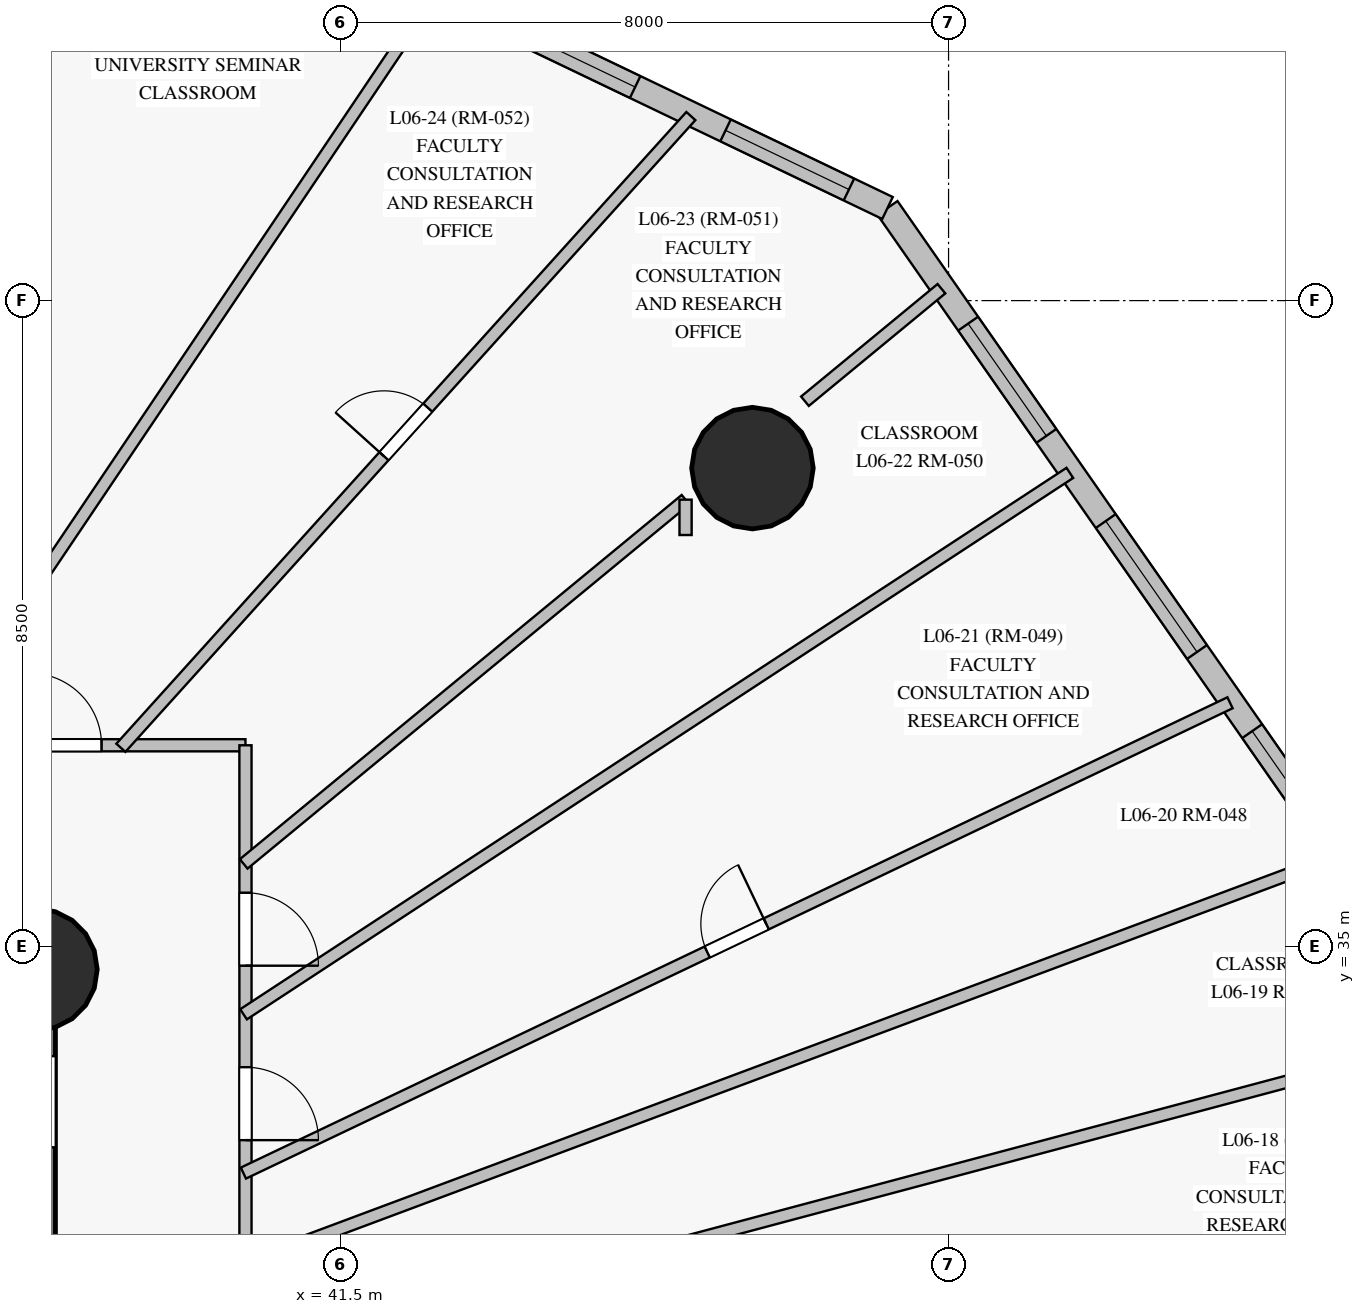
"""IFC4 building model, lengths in metres.
Left out: names, types, materials, properties, quantities, classifications, styles, units other than length and angle.
Written with IfcOpenShell. Run it as: python <this file> out.ifc"""

import sys

from ifc_helpers import new_model, si_unit, direction, frame, frame_2d, origin, origin_with_axes, origin_2d, place, context, subcontext, project, spatial, rectangle, circle, extrude, source, transform, mapped, element, fill, save


model = new_model("IFC4")
c1 = context("Model", 3, precision=1e-05, world=origin(), true_north=direction((0.0, 1.0)))
c2 = subcontext(c1, "Body", "Model", "MODEL_VIEW")
j1 = project(units=[si_unit("LENGTHUNIT", "METRE"), si_unit("PLANEANGLEUNIT", "RADIAN")], contexts=[c1])
p1 = place(None, origin())
s1 = spatial("IfcSite", under=j1, at=p1, CompositionType="ELEMENT")
p2 = place(p1, origin())
s2 = spatial("IfcBuilding", under=s1, at=p2, CompositionType="ELEMENT")
p3 = place(p2, frame((0.0, 0.0, 26.5)))
s3 = spatial("IfcBuildingStorey", under=s2, at=p3, CompositionType="ELEMENT", Elevation=26.5)
p4 = place(p3, frame((37.5, 18.3, 0.0), z_axis=(0.0, 0.0, 1.0), x_axis=(0.0, 1.0, 0.0)))
e1 = element("IfcWall", 1, at=p4, inside=s3, PredefinedType="SHEAR", context=c2, shape_type="SweptSolid", body=[
    extrude(rectangle(XDim=16.4, YDim=0.5, at=frame_2d((8.2, 0.0))), origin(), (0.0, 0.0, 1.0), 3.35),
])
p5 = place(p4, frame((14.06, 0.0, 0.0)))
e2 = element("IfcOpeningElement", 2, at=p5, cuts=e1, PredefinedType="OPENING", context=c2, shape_type="SweptSolid", body=[
    extrude(rectangle(XDim=1.2, YDim=2.15, at=frame_2d((0.6, 1.075))), frame((0.0, 0.26, 0.0), z_axis=(0.0, -1.0, 0.0), x_axis=(1.0, 0.0, 0.0)), (0.0, 0.0, 1.0), 0.52),
])
m1 = source(origin_with_axes(), c2, "Body", "SweptSolid", [
    extrude(circle(Radius=0.8, at=origin_2d()), origin(), (0.0, 0.0, 1.0), 3.6),
])
for number, where, z_axis, x_axis in (
    (3, (37.5, 34.7, 0.0), (0.0, 0.0, 1.0), (1.0, 0.0, 0.0)),
    (4, (46.92, 41.296, 0.0), (0.0, 0.0, 1.0), (1.0, 0.0, 0.0)),
):
    element("IfcColumn", number, at=place(p3, frame(where, z_axis=z_axis, x_axis=x_axis)), inside=s3, PredefinedType="COLUMN", context=c2, shape_type="MappedRepresentation", body=[
        mapped(m1, transform((0.0, 0.0, 0.0), scale=1.0)),
    ])
p6 = place(p3, frame((56.4, 33.668, 0.0), z_axis=(0.0, 0.0, 1.0), x_axis=(-0.571842194633, 0.820363641586, 0.0)))
e5 = element("IfcWall", 5, at=p6, inside=s3, PredefinedType="SOLIDWALL", context=c2, shape_type="SweptSolid", body=[
    extrude(rectangle(XDim=13.47, YDim=0.32, at=frame_2d((6.735, 0.0))), origin(), (0.0, 0.0, 1.0), 3.35),
])
p7 = place(p6, frame((0.77, 0.0, 0.85)))
e6 = element("IfcOpeningElement", 6, at=p7, cuts=e5, PredefinedType="OPENING", context=c2, shape_type="SweptSolid", body=[
    extrude(rectangle(XDim=1.8, YDim=1.85, at=frame_2d((0.9, 0.925))), frame((0.0, 0.17, 0.0), z_axis=(0.0, -1.0, 0.0), x_axis=(1.0, 0.0, 0.0)), (0.0, 0.0, 1.0), 0.34),
])
p8 = place(p6, frame((3.581, 0.0, 0.85)))
e7 = element("IfcOpeningElement", 7, at=p8, cuts=e5, PredefinedType="OPENING", context=c2, shape_type="SweptSolid", body=[
    extrude(rectangle(XDim=1.5, YDim=1.85, at=frame_2d((0.75, 0.925))), frame((0.0, 0.17, 0.0), z_axis=(0.0, -1.0, 0.0), x_axis=(1.0, 0.0, 0.0)), (0.0, 0.0, 1.0), 0.34),
])
p9 = place(p6, frame((6.35, 0.0, 0.85)))
e8 = element("IfcOpeningElement", 8, at=p9, cuts=e5, PredefinedType="OPENING", context=c2, shape_type="SweptSolid", body=[
    extrude(rectangle(XDim=2.1, YDim=1.95, at=frame_2d((1.05, 0.975))), frame((0.0, 0.17, 0.0), z_axis=(0.0, -1.0, 0.0), x_axis=(1.0, 0.0, 0.0)), (0.0, 0.0, 1.0), 0.34),
])
p10 = place(p6, frame((9.816, 0.0, 0.85)))
e9 = element("IfcOpeningElement", 9, at=p10, cuts=e5, PredefinedType="OPENING", context=c2, shape_type="SweptSolid", body=[
    extrude(rectangle(XDim=1.8, YDim=1.85, at=frame_2d((0.9, 0.925))), frame((0.0, 0.17, 0.0), z_axis=(0.0, -1.0, 0.0), x_axis=(1.0, 0.0, 0.0)), (0.0, 0.0, 1.0), 0.34),
])
p11 = place(p3, frame((48.697, 44.718, 0.0), z_axis=(0.0, 0.0, 1.0), x_axis=(-0.901740587255, 0.432277588242, 0.0)))
e10 = element("IfcWall", 10, at=p11, inside=s3, PredefinedType="SOLIDWALL", context=c2, shape_type="SweptSolid", body=[
    extrude(rectangle(XDim=10.853, YDim=0.32, at=frame_2d((5.426, 0.0))), origin(), (0.0, 0.0, 1.0), 3.35),
])
p12 = place(p11, frame((0.563, 0.0, 0.85)))
e11 = element("IfcOpeningElement", 11, at=p12, cuts=e10, PredefinedType="OPENING", context=c2, shape_type="SweptSolid", body=[
    extrude(rectangle(XDim=1.8, YDim=1.85, at=frame_2d((0.9, 0.925))), frame((0.0, 0.17, 0.0), z_axis=(0.0, -1.0, 0.0), x_axis=(1.0, 0.0, 0.0)), (0.0, 0.0, 1.0), 0.34),
])
p13 = place(p11, frame((3.682, 0.0, 0.85)))
e12 = element("IfcOpeningElement", 12, at=p13, cuts=e10, PredefinedType="OPENING", context=c2, shape_type="SweptSolid", body=[
    extrude(rectangle(XDim=2.1, YDim=1.95, at=frame_2d((1.05, 0.975))), frame((0.0, 0.17, 0.0), z_axis=(0.0, -1.0, 0.0), x_axis=(1.0, 0.0, 0.0)), (0.0, 0.0, 1.0), 0.34),
])
p14 = place(p11, frame((7.645, 0.0, 0.85)))
e13 = element("IfcOpeningElement", 13, at=p14, cuts=e10, PredefinedType="OPENING", context=c2, shape_type="SweptSolid", body=[
    extrude(rectangle(XDim=2.1, YDim=1.95, at=frame_2d((1.05, 0.975))), frame((0.0, 0.17, 0.0), z_axis=(0.0, -1.0, 0.0), x_axis=(1.0, 0.0, 0.0)), (0.0, 0.0, 1.0), 0.34),
])
p15 = place(p3, frame((10.5, 37.65, 0.0), z_axis=(0.0, 0.0, 1.0), x_axis=(1.0, 0.0, 0.0)))
e14 = element("IfcWall", 14, at=p15, inside=s3, PredefinedType="PARTITIONING", context=c2, shape_type="SweptSolid", body=[
    extrude(rectangle(XDim=29.75, YDim=0.16, at=frame_2d((14.875, 0.0))), origin(), (0.0, 0.0, 1.0), 2.75),
])
p16 = place(p15, frame((26.906, 0.0, 0.0)))
e15 = element("IfcOpeningElement", 15, at=p16, cuts=e14, PredefinedType="OPENING", context=c2, shape_type="SweptSolid", body=[
    extrude(rectangle(XDim=0.95, YDim=2.15, at=frame_2d((0.475, 1.075))), frame((0.0, 0.09, 0.0), z_axis=(0.0, -1.0, 0.0), x_axis=(1.0, 0.0, 0.0)), (0.0, 0.0, 1.0), 0.18),
])
p17 = place(p15, frame((24.377, 0.0, 0.0)))
e16 = element("IfcOpeningElement", 16, at=p17, cuts=e14, PredefinedType="OPENING", context=c2, shape_type="SweptSolid", body=[
    extrude(rectangle(XDim=0.95, YDim=2.15, at=frame_2d((0.475, 1.075))), frame((0.0, 0.09, 0.0), z_axis=(0.0, -1.0, 0.0), x_axis=(1.0, 0.0, 0.0)), (0.0, 0.0, 1.0), 0.18),
])
p18 = place(p15, frame((21.812, 0.0, 0.0)))
e17 = element("IfcOpeningElement", 17, at=p18, cuts=e14, PredefinedType="OPENING", context=c2, shape_type="SweptSolid", body=[
    extrude(rectangle(XDim=0.96, YDim=2.15, at=frame_2d((0.48, 1.075))), frame((0.0, 0.09, 0.0), z_axis=(0.0, -1.0, 0.0), x_axis=(1.0, 0.0, 0.0)), (0.0, 0.0, 1.0), 0.18),
])
p19 = place(p15, frame((19.548, 0.0, 0.0)))
e18 = element("IfcOpeningElement", 18, at=p19, cuts=e14, PredefinedType="OPENING", context=c2, shape_type="SweptSolid", body=[
    extrude(rectangle(XDim=0.95, YDim=2.15, at=frame_2d((0.475, 1.075))), frame((0.0, 0.09, 0.0), z_axis=(0.0, -1.0, 0.0), x_axis=(1.0, 0.0, 0.0)), (0.0, 0.0, 1.0), 0.18),
])
p20 = place(p15, frame((17.272, 0.0, 0.0)))
e19 = element("IfcOpeningElement", 19, at=p20, cuts=e14, PredefinedType="OPENING", context=c2, shape_type="SweptSolid", body=[
    extrude(rectangle(XDim=0.95, YDim=2.15, at=frame_2d((0.475, 1.075))), frame((0.0, 0.09, 0.0), z_axis=(0.0, -1.0, 0.0), x_axis=(1.0, 0.0, 0.0)), (0.0, 0.0, 1.0), 0.18),
])
p21 = place(p15, frame((15.625, 0.0, 0.0)))
e20 = element("IfcOpeningElement", 20, at=p21, cuts=e14, PredefinedType="OPENING", context=c2, shape_type="SweptSolid", body=[
    extrude(rectangle(XDim=0.96, YDim=2.15, at=frame_2d((0.48, 1.075))), frame((0.0, 0.09, 0.0), z_axis=(0.0, -1.0, 0.0), x_axis=(1.0, 0.0, 0.0)), (0.0, 0.0, 1.0), 0.18),
])
p22 = place(p15, frame((14.4, 0.0, 0.0)))
e21 = element("IfcOpeningElement", 21, at=p22, cuts=e14, PredefinedType="OPENING", context=c2, shape_type="SweptSolid", body=[
    extrude(rectangle(XDim=0.95, YDim=2.15, at=frame_2d((0.475, 1.075))), frame((0.0, 0.09, 0.0), z_axis=(0.0, -1.0, 0.0), x_axis=(1.0, 0.0, 0.0)), (0.0, 0.0, 1.0), 0.18),
])
p23 = place(p15, frame((9.938, 0.0, 0.0)))
e22 = element("IfcOpeningElement", 22, at=p23, cuts=e14, PredefinedType="OPENING", context=c2, shape_type="SweptSolid", body=[
    extrude(rectangle(XDim=0.95, YDim=2.15, at=frame_2d((0.475, 1.075))), frame((0.0, 0.09, 0.0), z_axis=(0.0, -1.0, 0.0), x_axis=(1.0, 0.0, 0.0)), (0.0, 0.0, 1.0), 0.18),
])
p24 = place(p3, frame((40.25, 37.65, 0.0), z_axis=(0.0, 0.0, 1.0), x_axis=(0.0, -1.0, 0.0)))
e23 = element("IfcWall", 23, at=p24, inside=s3, PredefinedType="PARTITIONING", context=c2, shape_type="SweptSolid", body=[
    extrude(rectangle(XDim=22.3, YDim=0.16, at=frame_2d((11.15, 0.0))), origin(), (0.0, 0.0, 1.0), 2.75),
])
p25 = place(p24, frame((16.25, 0.0, 0.0)))
e24 = element("IfcOpeningElement", 24, at=p25, cuts=e23, PredefinedType="OPENING", context=c2, shape_type="SweptSolid", body=[
    extrude(rectangle(XDim=0.96, YDim=2.15, at=frame_2d((0.48, 1.075))), frame((0.0, 0.09, 0.0), z_axis=(0.0, -1.0, 0.0), x_axis=(1.0, 0.0, 0.0)), (0.0, 0.0, 1.0), 0.18),
])
p26 = place(p24, frame((14.02, 0.0, 0.0)))
e25 = element("IfcOpeningElement", 25, at=p26, cuts=e23, PredefinedType="OPENING", context=c2, shape_type="SweptSolid", body=[
    extrude(rectangle(XDim=0.95, YDim=2.15, at=frame_2d((0.475, 1.075))), frame((0.0, 0.09, 0.0), z_axis=(0.0, -1.0, 0.0), x_axis=(1.0, 0.0, 0.0)), (0.0, 0.0, 1.0), 0.18),
])
p27 = place(p24, frame((12.052, 0.0, 0.0)))
e26 = element("IfcOpeningElement", 26, at=p27, cuts=e23, PredefinedType="OPENING", context=c2, shape_type="SweptSolid", body=[
    extrude(rectangle(XDim=0.95, YDim=2.15, at=frame_2d((0.475, 1.075))), frame((0.0, 0.09, 0.0), z_axis=(0.0, -1.0, 0.0), x_axis=(1.0, 0.0, 0.0)), (0.0, 0.0, 1.0), 0.18),
])
p28 = place(p24, frame((4.235, 0.0, 0.0)))
e27 = element("IfcOpeningElement", 27, at=p28, cuts=e23, PredefinedType="OPENING", context=c2, shape_type="SweptSolid", body=[
    extrude(rectangle(XDim=0.96, YDim=2.15, at=frame_2d((0.48, 1.075))), frame((0.0, 0.09, 0.0), z_axis=(0.0, -1.0, 0.0), x_axis=(1.0, 0.0, 0.0)), (0.0, 0.0, 1.0), 0.18),
])
p29 = place(p24, frame((10.45, 0.0, 0.0)))
e28 = element("IfcOpeningElement", 28, at=p29, cuts=e23, PredefinedType="OPENING", context=c2, shape_type="SweptSolid", body=[
    extrude(rectangle(XDim=0.86, YDim=2.1, at=frame_2d((0.43, 1.05))), frame((0.0, 0.09, 0.0), z_axis=(0.0, -1.0, 0.0), x_axis=(1.0, 0.0, 0.0)), (0.0, 0.0, 1.0), 0.18),
])
p30 = place(p24, frame((1.94, 0.0, 0.0)))
e29 = element("IfcOpeningElement", 29, at=p30, cuts=e23, PredefinedType="OPENING", context=c2, shape_type="SweptSolid", body=[
    extrude(rectangle(XDim=0.96, YDim=2.15, at=frame_2d((0.48, 1.075))), frame((0.0, 0.09, 0.0), z_axis=(0.0, -1.0, 0.0), x_axis=(1.0, 0.0, 0.0)), (0.0, 0.0, 1.0), 0.18),
])
p31 = place(p24, frame((17.39, 0.0, 0.0)))
e30 = element("IfcOpeningElement", 30, at=p31, cuts=e23, PredefinedType="OPENING", context=c2, shape_type="SweptSolid", body=[
    extrude(rectangle(XDim=0.95, YDim=2.15, at=frame_2d((0.475, 1.075))), frame((0.0, 0.09, 0.0), z_axis=(0.0, -1.0, 0.0), x_axis=(1.0, 0.0, 0.0)), (0.0, 0.0, 1.0), 0.18),
])
p32 = place(p24, frame((18.522, 0.0, 0.0)))
e31 = element("IfcOpeningElement", 31, at=p32, cuts=e23, PredefinedType="OPENING", context=c2, shape_type="SweptSolid", body=[
    extrude(rectangle(XDim=0.95, YDim=2.15, at=frame_2d((0.475, 1.075))), frame((0.0, 0.09, 0.0), z_axis=(0.0, -1.0, 0.0), x_axis=(1.0, 0.0, 0.0)), (0.0, 0.0, 1.0), 0.18),
])
p33 = place(p24, frame((8.331, 0.0, 0.0)))
e32 = element("IfcOpeningElement", 32, at=p33, cuts=e23, PredefinedType="OPENING", context=c2, shape_type="SweptSolid", body=[
    extrude(rectangle(XDim=0.86, YDim=2.04, at=frame_2d((0.43, 1.02))), frame((0.0, 0.09, 0.0), z_axis=(0.0, -1.0, 0.0), x_axis=(1.0, 0.0, 0.0)), (0.0, 0.0, 1.0), 0.18),
])
p34 = place(p24, frame((6.992, 0.0, 0.0)))
e33 = element("IfcOpeningElement", 33, at=p34, cuts=e23, PredefinedType="OPENING", context=c2, shape_type="SweptSolid", body=[
    extrude(rectangle(XDim=0.86, YDim=2.04, at=frame_2d((0.43, 1.02))), frame((0.0, 0.09, 0.0), z_axis=(0.0, -1.0, 0.0), x_axis=(1.0, 0.0, 0.0)), (0.0, 0.0, 1.0), 0.18),
])
p35 = place(p3, frame((40.207, 29.559, 0.0), z_axis=(0.0, 0.0, 1.0), x_axis=(0.966241529616, 0.257637936736, 0.0)))
e34 = element("IfcWall", 34, at=p35, inside=s3, PredefinedType="PARTITIONING", context=c2, shape_type="SweptSolid", body=[
    extrude(rectangle(XDim=16.601, YDim=0.16, at=frame_2d((8.301, 0.0))), origin(), (0.0, 0.0, 1.0), 3.35),
])
p36 = place(p3, frame((40.222, 30.815, 0.0), z_axis=(0.0, 0.0, 1.0), x_axis=(0.936757036067, 0.349980364276, 0.0)))
e35 = element("IfcWall", 35, at=p36, inside=s3, PredefinedType="PARTITIONING", context=c2, shape_type="SweptSolid", body=[
    extrude(rectangle(XDim=15.358, YDim=0.16, at=frame_2d((7.679, 0.0))), origin(), (0.0, 0.0, 1.0), 3.35),
])
p37 = place(p3, frame((40.223, 32.021, 0.0), z_axis=(0.0, 0.0, 1.0), x_axis=(0.902690033132, 0.430291417629, 0.0)))
e36 = element("IfcWall", 36, at=p37, inside=s3, PredefinedType="PARTITIONING", context=c2, shape_type="SweptSolid", body=[
    extrude(rectangle(XDim=14.379, YDim=0.16, at=frame_2d((7.189, 0.0))), origin(), (0.0, 0.0, 1.0), 3.35),
])
p38 = place(p37, frame((6.76, 0.0, 0.0)))
e37 = element("IfcOpeningElement", 37, at=p38, cuts=e36, PredefinedType="OPENING", context=c2, shape_type="SweptSolid", body=[
    extrude(rectangle(XDim=0.86, YDim=2.04, at=frame_2d((0.43, 1.02))), frame((0.0, 0.09, 0.0), z_axis=(0.0, -1.0, 0.0), x_axis=(1.0, 0.0, 0.0)), (0.0, 0.0, 1.0), 0.18),
])
p39 = place(p3, frame((40.225, 34.111, 0.0), z_axis=(0.0, 0.0, 1.0), x_axis=(0.836442719116, 0.548054356463, 0.0)))
e38 = element("IfcWall", 38, at=p39, inside=s3, PredefinedType="PARTITIONING", context=c2, shape_type="SweptSolid", body=[
    extrude(rectangle(XDim=12.997, YDim=0.16, at=frame_2d((6.498, 0.0))), origin(), (0.0, 0.0, 1.0), 3.35),
])
p40 = place(p3, frame((33.512, 37.609, 0.0), z_axis=(0.0, 0.0, 1.0), x_axis=(0.406737794038, 0.9135449452, 0.0)))
e39 = element("IfcWall", 39, at=p40, inside=s3, PredefinedType="PARTITIONING", context=c2, shape_type="SweptSolid", body=[
    extrude(rectangle(XDim=12.886, YDim=0.16, at=frame_2d((6.443, 0.0))), origin(), (0.0, 0.0, 1.0), 3.35),
])
p41 = place(p3, frame((36.062, 37.625, 0.0), z_axis=(0.0, 0.0, 1.0), x_axis=(0.558468232685, 0.829525908626, 0.0)))
e40 = element("IfcWall", 40, at=p41, inside=s3, PredefinedType="PARTITIONING", context=c2, shape_type="SweptSolid", body=[
    extrude(rectangle(XDim=11.958, YDim=0.16, at=frame_2d((5.979, 0.0))), origin(), (0.0, 0.0, 1.0), 3.35),
])
p42 = place(p3, frame((38.611, 37.617, 0.0), z_axis=(0.0, 0.0, 1.0), x_axis=(0.669895621774, 0.742455288841, 0.0)))
e41 = element("IfcWall", 41, at=p42, inside=s3, PredefinedType="PARTITIONING", context=c2, shape_type="SweptSolid", body=[
    extrude(rectangle(XDim=11.194, YDim=0.16, at=frame_2d((5.597, 0.0))), origin(), (0.0, 0.0, 1.0), 3.35),
])
p43 = place(p42, frame((5.167, 0.0, 0.0)))
e42 = element("IfcOpeningElement", 42, at=p43, cuts=e41, PredefinedType="OPENING", context=c2, shape_type="SweptSolid", body=[
    extrude(rectangle(XDim=0.86, YDim=2.04, at=frame_2d((0.43, 1.02))), frame((0.0, 0.09, 0.0), z_axis=(0.0, -1.0, 0.0), x_axis=(1.0, 0.0, 0.0)), (0.0, 0.0, 1.0), 0.18),
])
p44 = place(p3, frame((40.227, 36.089, 0.0), z_axis=(0.0, 0.0, 1.0), x_axis=(0.771628936431, 0.636072939577, 0.0)))
e43 = element("IfcWall", 43, at=p44, inside=s3, PredefinedType="PARTITIONING", context=c2, shape_type="SweptSolid", body=[
    extrude(rectangle(XDim=7.534, YDim=0.16, at=frame_2d((3.767, 0.0))), origin(), (0.0, 0.0, 1.0), 2.7),
])
p45 = place(p3, frame((47.611, 42.176, 0.0), z_axis=(0.0, 0.0, 1.0), x_axis=(0.771572789391, 0.636141046209, 0.0)))
e44 = element("IfcWall", 44, at=p45, inside=s3, PredefinedType="PARTITIONING", context=c2, shape_type="SweptSolid", body=[
    extrude(rectangle(XDim=2.327, YDim=0.16, at=frame_2d((1.164, 0.0))), origin(), (0.0, 0.0, 1.0), 3.35),
])
p46 = place(p3, frame((46.04, 40.881, 0.0), z_axis=(0.0, 0.0, 1.0), x_axis=(0.0, -1.0, 0.0)))
e45 = element("IfcWall", 45, at=p46, inside=s3, PredefinedType="PARTITIONING", context=c2, shape_type="SweptSolid", body=[
    extrude(rectangle(XDim=0.465, YDim=0.16, at=frame_2d((0.232, 0.0))), origin(), (0.0, 0.0, 1.0), 3.35),
])
m2 = source(origin_with_axes(), c2, "Body", "SweptSolid", [
    extrude(rectangle(XDim=1.5, YDim=1.85, at=frame_2d((0.75, 0.925))), frame((0.0, 0.03, 0.0), z_axis=(0.0, -1.0, 0.0), x_axis=(1.0, 0.0, 0.0)), (0.0, 0.0, 1.0), 0.06),
])
p47 = place(p8, origin())
e46 = element("IfcWindow", 46, at=p47, inside=s3, PartitioningType="SINGLE_PANEL", PredefinedType="WINDOW", context=c2, shape_type="MappedRepresentation", body=[
    mapped(m2, transform((0.0, 0.0, 0.0), scale=1.0)),
])
fill(e7, e46)
m3 = source(origin_with_axes(), c2, "Body", "SweptSolid", [
    extrude(rectangle(XDim=2.1, YDim=1.95, at=frame_2d((1.05, 0.975))), frame((0.0, 0.03, 0.0), z_axis=(0.0, -1.0, 0.0), x_axis=(1.0, 0.0, 0.0)), (0.0, 0.0, 1.0), 0.06),
])
p48 = place(p9, origin())
e47 = element("IfcWindow", 47, at=p48, inside=s3, PartitioningType="SINGLE_PANEL", PredefinedType="WINDOW", context=c2, shape_type="MappedRepresentation", body=[
    mapped(m3, transform((0.0, 0.0, 0.0), scale=1.0)),
])
fill(e8, e47)
m4 = source(origin_with_axes(), c2, "Body", "SweptSolid", [
    extrude(rectangle(XDim=1.8, YDim=1.85, at=frame_2d((0.9, 0.925))), frame((0.0, 0.03, 0.0), z_axis=(0.0, -1.0, 0.0), x_axis=(1.0, 0.0, 0.0)), (0.0, 0.0, 1.0), 0.06),
])
p49 = place(p10, origin())
e48 = element("IfcWindow", 48, at=p49, inside=s3, PartitioningType="SINGLE_PANEL", PredefinedType="WINDOW", context=c2, shape_type="MappedRepresentation", body=[
    mapped(m4, transform((0.0, 0.0, 0.0), scale=1.0)),
])
fill(e9, e48)
p50 = place(p12, origin())
e49 = element("IfcWindow", 49, at=p50, inside=s3, PartitioningType="SINGLE_PANEL", PredefinedType="WINDOW", context=c2, shape_type="MappedRepresentation", body=[
    mapped(m4, transform((0.0, 0.0, 0.0), scale=1.0)),
])
fill(e11, e49)
p51 = place(p13, origin())
e50 = element("IfcWindow", 50, at=p51, inside=s3, PartitioningType="SINGLE_PANEL", PredefinedType="WINDOW", context=c2, shape_type="MappedRepresentation", body=[
    mapped(m3, transform((0.0, 0.0, 0.0), scale=1.0)),
])
fill(e12, e50)
m5 = source(origin_with_axes(), c2, "Body", "SweptSolid", [
    extrude(rectangle(XDim=0.96, YDim=2.15, at=frame_2d((0.48, 1.075))), frame((0.0, 0.025, 0.0), z_axis=(0.0, -1.0, 0.0), x_axis=(1.0, 0.0, 0.0)), (0.0, 0.0, 1.0), 0.05),
])
p52 = place(p28, origin())
e51 = element("IfcDoor", 51, at=p52, inside=s3, OperationType="SINGLE_SWING_RIGHT", PredefinedType="DOOR", context=c2, shape_type="MappedRepresentation", body=[
    mapped(m5, transform((0.0, 0.0, 0.0), scale=1.0)),
])
fill(e27, e51)
p53 = place(p30, origin())
e52 = element("IfcDoor", 52, at=p53, inside=s3, OperationType="SINGLE_SWING_RIGHT", PredefinedType="DOOR", context=c2, shape_type="MappedRepresentation", body=[
    mapped(m5, transform((0.0, 0.0, 0.0), scale=1.0)),
])
fill(e29, e52)
m6 = source(origin_with_axes(), c2, "Body", "SweptSolid", [
    extrude(rectangle(XDim=0.95, YDim=2.15, at=frame_2d((0.475, 1.075))), frame((0.0, 0.025, 0.0), z_axis=(0.0, -1.0, 0.0), x_axis=(1.0, 0.0, 0.0)), (0.0, 0.0, 1.0), 0.05),
])
p54 = place(p16, origin())
e53 = element("IfcDoor", 53, at=p54, inside=s3, OperationType="SINGLE_SWING_LEFT", PredefinedType="DOOR", context=c2, shape_type="MappedRepresentation", body=[
    mapped(m6, transform((0.0, 0.0, 0.0), scale=1.0)),
])
fill(e15, e53)
m7 = source(origin_with_axes(), c2, "Body", "SweptSolid", [
    extrude(rectangle(XDim=0.86, YDim=2.04, at=frame_2d((0.43, 1.02))), frame((0.0, 0.025, 0.0), z_axis=(0.0, -1.0, 0.0), x_axis=(1.0, 0.0, 0.0)), (0.0, 0.0, 1.0), 0.05),
])
p55 = place(p38, origin())
e54 = element("IfcDoor", 54, at=p55, inside=s3, OperationType="SINGLE_SWING_RIGHT", PredefinedType="DOOR", context=c2, shape_type="MappedRepresentation", body=[
    mapped(m7, transform((0.0, 0.0, 0.0), scale=1.0)),
])
fill(e37, e54)
p56 = place(p43, origin())
e55 = element("IfcDoor", 55, at=p56, inside=s3, OperationType="SINGLE_SWING_LEFT", PredefinedType="DOOR", context=c2, shape_type="MappedRepresentation", body=[
    mapped(m7, transform((0.0, 0.0, 0.0), scale=1.0)),
])
fill(e42, e55)
save(model, sys.argv[1])
